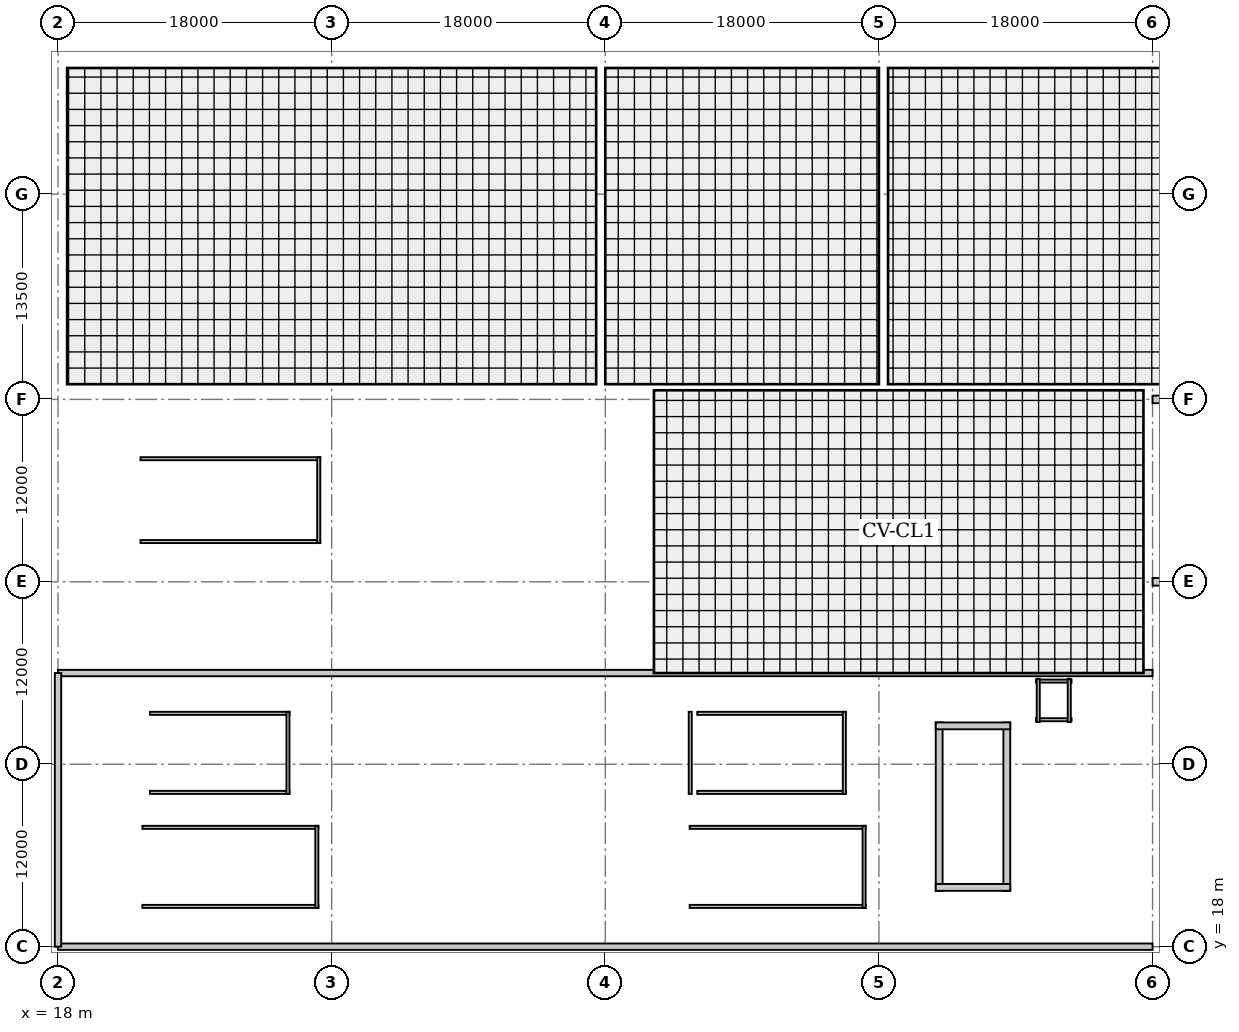
"""IFC4 building model, lengths in metres.
Left out: names, types, materials, properties, quantities, classifications, styles, units other than length and angle.
Written with IfcOpenShell. Run it as: python <this file> out.ifc"""

import sys

from ifc_helpers import new_model, si_unit, direction, frame, frame_2d, origin, origin_2d, place, context, subcontext, project, spatial, rectangle, circle, extrude, element, fill, save


model = new_model("IFC4")
c1 = context("Model", 3, precision=1e-05, world=origin(), true_north=direction((0.0, 1.0)))
c2 = subcontext(c1, "Body", "Model", "MODEL_VIEW")
j1 = project(units=[si_unit("LENGTHUNIT", "METRE"), si_unit("PLANEANGLEUNIT", "RADIAN")], contexts=[c1])
p1 = place(None, origin())
s1 = spatial("IfcSite", under=j1, at=p1, CompositionType="ELEMENT")
p2 = place(p1, origin())
s2 = spatial("IfcBuilding", under=s1, at=p2, CompositionType="ELEMENT")
p3 = place(p2, frame((0.0, 0.0, -5.4)))
s3 = spatial("IfcBuildingStorey", under=s2, at=p3, CompositionType="ELEMENT", Elevation=-5.4)
for number, where, z_axis, x_axis in (
    (1, (18.0, 18.0, 0.0), (0.0, 0.0, 1.0), (1.0, 0.0, 0.0)),
    (2, (18.0, 30.0, 0.0), (0.0, 0.0, 1.0), (1.0, 0.0, 0.0)),
    (3, (18.0, 36.0, 0.0), (0.0, 0.0, 1.0), (1.0, 0.0, 0.0)),
    (4, (18.0, 42.0, 0.0), (0.0, 0.0, 1.0), (1.0, 0.0, 0.0)),
    (5, (18.0, 54.0, 0.0), (0.0, 0.0, 1.0), (1.0, 0.0, 0.0)),
):
    element("IfcColumn", number, at=place(p3, frame(where, z_axis=z_axis, x_axis=x_axis)), inside=s3, PredefinedType="COLUMN", context=c2, shape_type="SweptSolid", body=[
        extrude(circle(Radius=0.5, at=origin_2d()), origin(), (0.0, 0.0, 1.0), 5.4),
    ])
p4 = place(p3, frame((18.0, 67.5, 0.0), z_axis=(0.0, 0.0, 1.0), x_axis=(1.0, 0.0, 0.0)))
e6 = element("IfcColumn", 6, at=p4, inside=s3, PredefinedType="COLUMN", context=c2, shape_type="SweptSolid", body=[
    extrude(rectangle(XDim=1.6, YDim=1.2, at=origin_2d()), origin(), (0.0, 0.0, 1.0), 5.4),
])
for number, where, z_axis, x_axis in (
    (7, (36.0, 18.0, 0.0), (0.0, 0.0, 1.0), (1.0, 0.0, 0.0)),
    (8, (36.0, 30.0, 0.0), (0.0, 0.0, 1.0), (1.0, 0.0, 0.0)),
    (9, (36.0, 36.0, 0.0), (0.0, 0.0, 1.0), (1.0, 0.0, 0.0)),
    (10, (36.0, 42.0, 0.0), (0.0, 0.0, 1.0), (1.0, 0.0, 0.0)),
    (11, (36.0, 54.0, 0.0), (0.0, 0.0, 1.0), (1.0, 0.0, 0.0)),
):
    element("IfcColumn", number, at=place(p3, frame(where, z_axis=z_axis, x_axis=x_axis)), inside=s3, PredefinedType="COLUMN", context=c2, shape_type="SweptSolid", body=[
        extrude(circle(Radius=0.5, at=origin_2d()), origin(), (0.0, 0.0, 1.0), 5.4),
    ])
p5 = place(p3, frame((36.0, 67.5, 0.0), z_axis=(0.0, 0.0, 1.0), x_axis=(1.0, 0.0, 0.0)))
e12 = element("IfcColumn", 12, at=p5, inside=s3, PredefinedType="COLUMN", context=c2, shape_type="SweptSolid", body=[
    extrude(rectangle(XDim=1.6, YDim=1.2, at=origin_2d()), origin(), (0.0, 0.0, 1.0), 5.4),
])
for number, where, z_axis, x_axis in (
    (13, (54.0, 18.0, 0.0), (0.0, 0.0, 1.0), (1.0, 0.0, 0.0)),
    (14, (54.0, 30.0, 0.0), (0.0, 0.0, 1.0), (1.0, 0.0, 0.0)),
    (15, (54.0, 36.0, 0.0), (0.0, 0.0, 1.0), (1.0, 0.0, 0.0)),
    (16, (54.0, 42.0, 0.0), (0.0, 0.0, 1.0), (1.0, 0.0, 0.0)),
    (17, (54.0, 54.0, 0.0), (0.0, 0.0, 1.0), (1.0, 0.0, 0.0)),
):
    element("IfcColumn", number, at=place(p3, frame(where, z_axis=z_axis, x_axis=x_axis)), inside=s3, PredefinedType="COLUMN", context=c2, shape_type="SweptSolid", body=[
        extrude(circle(Radius=0.5, at=origin_2d()), origin(), (0.0, 0.0, 1.0), 5.4),
    ])
p6 = place(p3, frame((54.0, 67.5, 0.0), z_axis=(0.0, 0.0, 1.0), x_axis=(1.0, 0.0, 0.0)))
e18 = element("IfcColumn", 18, at=p6, inside=s3, PredefinedType="COLUMN", context=c2, shape_type="SweptSolid", body=[
    extrude(rectangle(XDim=1.6, YDim=1.2, at=origin_2d()), origin(), (0.0, 0.0, 1.0), 5.4),
])
for number, where, z_axis, x_axis in (
    (19, (72.0, 18.0, 0.0), (0.0, 0.0, 1.0), (1.0, 0.0, 0.0)),
    (20, (72.0, 30.0, 0.0), (0.0, 0.0, 1.0), (1.0, 0.0, 0.0)),
    (21, (72.0, 36.0, 0.0), (0.0, 0.0, 1.0), (1.0, 0.0, 0.0)),
    (22, (72.0, 42.0, 0.0), (0.0, 0.0, 1.0), (1.0, 0.0, 0.0)),
    (23, (72.0, 54.0, 0.0), (0.0, 0.0, 1.0), (1.0, 0.0, 0.0)),
):
    element("IfcColumn", number, at=place(p3, frame(where, z_axis=z_axis, x_axis=x_axis)), inside=s3, PredefinedType="COLUMN", context=c2, shape_type="SweptSolid", body=[
        extrude(circle(Radius=0.5, at=origin_2d()), origin(), (0.0, 0.0, 1.0), 5.4),
    ])
p7 = place(p3, frame((72.0, 67.5, 0.0), z_axis=(0.0, 0.0, 1.0), x_axis=(1.0, 0.0, 0.0)))
e24 = element("IfcColumn", 24, at=p7, inside=s3, PredefinedType="COLUMN", context=c2, shape_type="SweptSolid", body=[
    extrude(rectangle(XDim=1.6, YDim=1.2, at=origin_2d()), origin(), (0.0, 0.0, 1.0), 5.4),
])
for number, where, z_axis, x_axis in (
    (25, (90.0, 18.0, 0.0), (0.0, 0.0, 1.0), (1.0, 0.0, 0.0)),
    (26, (90.0, 30.0, 0.0), (0.0, 0.0, 1.0), (1.0, 0.0, 0.0)),
    (27, (90.0, 36.0, 0.0), (0.0, 0.0, 1.0), (1.0, 0.0, 0.0)),
    (28, (90.0, 42.0, 0.0), (0.0, 0.0, 1.0), (1.0, 0.0, 0.0)),
    (29, (90.0, 54.0, 0.0), (0.0, 0.0, 1.0), (1.0, 0.0, 0.0)),
):
    element("IfcColumn", number, at=place(p3, frame(where, z_axis=z_axis, x_axis=x_axis)), inside=s3, PredefinedType="COLUMN", context=c2, shape_type="SweptSolid", body=[
        extrude(circle(Radius=0.5, at=origin_2d()), origin(), (0.0, 0.0, 1.0), 5.4),
    ])
p8 = place(p3, frame((90.0, 67.5, 0.0), z_axis=(0.0, 0.0, 1.0), x_axis=(1.0, 0.0, 0.0)))
e30 = element("IfcColumn", 30, at=p8, inside=s3, PredefinedType="COLUMN", context=c2, shape_type="SweptSolid", body=[
    extrude(rectangle(XDim=1.6, YDim=1.2, at=origin_2d()), origin(), (0.0, 0.0, 1.0), 5.4),
])
for number, where, z_axis, x_axis in (
    (31, (18.0, 62.5, 0.0), (0.0, 0.0, 1.0), (1.0, 0.0, 0.0)),
    (32, (36.0, 62.5, 0.0), (0.0, 0.0, 1.0), (1.0, 0.0, 0.0)),
    (33, (54.0, 62.5, 0.0), (0.0, 0.0, 1.0), (1.0, 0.0, 0.0)),
    (34, (72.0, 62.5, 0.0), (0.0, 0.0, 1.0), (1.0, 0.0, 0.0)),
    (35, (90.0, 62.5, 0.0), (0.0, 0.0, 1.0), (1.0, 0.0, 0.0)),
):
    element("IfcColumn", number, at=place(p3, frame(where, z_axis=z_axis, x_axis=x_axis)), inside=s3, PredefinedType="COLUMN", context=c2, shape_type="SweptSolid", body=[
        extrude(rectangle(XDim=0.75, YDim=0.75, at=origin_2d()), origin(), (0.0, 0.0, 1.0), 5.02),
    ])
for number, where, z_axis, x_axis in (
    (36, (18.0, 76.5, 0.0), (0.0, 0.0, 1.0), (1.0, 0.0, 0.0)),
    (37, (36.0, 76.5, 0.0), (0.0, 0.0, 1.0), (1.0, 0.0, 0.0)),
    (38, (54.0, 76.5, 0.0), (0.0, 0.0, 1.0), (1.0, 0.0, 0.0)),
    (39, (72.0, 76.5, 0.0), (0.0, 0.0, 1.0), (1.0, 0.0, 0.0)),
    (40, (90.0, 76.5, 0.0), (0.0, 0.0, 1.0), (1.0, 0.0, 0.0)),
):
    element("IfcColumn", number, at=place(p3, frame(where, z_axis=z_axis, x_axis=x_axis)), inside=s3, PredefinedType="COLUMN", context=c2, shape_type="SweptSolid", body=[
        extrude(rectangle(XDim=0.75, YDim=0.75, at=origin_2d()), origin(), (0.0, 0.0, 1.0), 3.5),
    ])
for number, where, z_axis, x_axis in (
    (41, (90.0, 54.0, 0.0), (0.0, 0.0, 1.0), (1.0, 0.0, 0.0)),
    (42, (136.0, 42.0, 0.0), (0.0, 0.0, 1.0), (-1.0, 0.0, 0.0)),
):
    element("IfcWall", number, at=place(p3, frame(where, z_axis=z_axis, x_axis=x_axis)), inside=s3, PredefinedType="USERDEFINED", context=c2, shape_type="SweptSolid", body=[
        extrude(rectangle(XDim=46.0, YDim=0.5, at=frame_2d((23.0, 0.0))), origin(), (0.0, 0.0, 1.0), 5.05),
    ])
for number, where, z_axis, x_axis in (
    (43, (18.0, 18.0, 0.0), (0.0, 0.0, 1.0), (1.0, 0.0, 0.0)),
    (44, (90.0, 36.0, 0.0), (0.0, 0.0, 1.0), (-1.0, 0.0, 0.0)),
):
    element("IfcWall", number, at=place(p3, frame(where, z_axis=z_axis, x_axis=x_axis)), inside=s3, PredefinedType="USERDEFINED", context=c2, shape_type="SweptSolid", body=[
        extrude(rectangle(XDim=72.0, YDim=0.42, at=frame_2d((36.0, 0.0))), origin(), (0.0, 0.0, 1.0), 5.05),
    ])
p9 = place(p3, frame((18.0, 36.0, 0.0), z_axis=(0.0, 0.0, 1.0), x_axis=(0.0, -1.0, 0.0)))
e45 = element("IfcWall", 45, at=p9, inside=s3, PredefinedType="USERDEFINED", context=c2, shape_type="SweptSolid", body=[
    extrude(rectangle(XDim=18.0, YDim=0.42, at=frame_2d((9.0, 0.0))), origin(), (0.0, 0.0, 1.0), 5.05),
])
for number, where, z_axis, x_axis in (
    (46, (80.413, 21.675, 0.0), (0.0, 0.0, 1.0), (0.0, 1.0, 0.0)),
    (47, (75.962, 32.75, 0.0), (0.0, 0.0, 1.0), (0.0, -1.0, 0.0)),
):
    element("IfcWall", number, at=place(p3, frame(where, z_axis=z_axis, x_axis=x_axis)), inside=s3, PredefinedType="SHEAR", context=c2, shape_type="SweptSolid", body=[
        extrude(rectangle(XDim=11.075, YDim=0.45, at=frame_2d((5.538, 0.0))), origin(), (0.0, 0.0, 1.0), 5.05),
    ])
p10 = place(p3, frame((80.637, 32.525, 0.0), z_axis=(0.0, 0.0, 1.0), x_axis=(-1.0, 0.0, 0.0)))
e48 = element("IfcWall", 48, at=p10, inside=s3, PredefinedType="SHEAR", context=c2, shape_type="SweptSolid", body=[
    extrude(rectangle(XDim=4.9, YDim=0.45, at=frame_2d((2.45, 0.0))), origin(), (0.0, 0.0, 1.0), 5.05),
])
p11 = place(p3, frame((75.738, 21.9, 0.0), z_axis=(0.0, 0.0, 1.0), x_axis=(1.0, 0.0, 0.0)))
e49 = element("IfcWall", 49, at=p11, inside=s3, PredefinedType="SHEAR", context=c2, shape_type="SweptSolid", body=[
    extrude(rectangle(XDim=4.9, YDim=0.45, at=frame_2d((2.45, 0.0))), origin(), (0.0, 0.0, 1.0), 5.05),
])
p12 = place(p11, frame((1.1, 0.0, 0.0)))
e50 = element("IfcOpeningElement", 50, at=p12, cuts=e49, PredefinedType="OPENING", context=c2, shape_type="SweptSolid", body=[
    extrude(rectangle(XDim=1.3, YDim=2.1, at=frame_2d((0.65, 1.05))), frame((0.0, 0.235, 0.0), z_axis=(0.0, -1.0, 0.0), x_axis=(1.0, 0.0, 0.0)), (0.0, 0.0, 1.0), 0.47),
])
for number, where, z_axis, x_axis in (
    (51, (23.425, 55.4, 0.0), (0.0, 0.0, 1.0), (1.0, 0.0, 0.0)),
    (52, (35.25, 60.85, 0.0), (0.0, 0.0, 1.0), (-1.0, 0.0, 0.0)),
):
    element("IfcWall", number, at=place(p3, frame(where, z_axis=z_axis, x_axis=x_axis)), inside=s3, PredefinedType="SOLIDWALL", context=c2, shape_type="SweptSolid", body=[
        extrude(rectangle(XDim=11.825, YDim=0.2, at=frame_2d((5.913, 0.0))), origin(), (0.0, 0.0, 1.0), 5.02),
    ])
p13 = place(p3, frame((35.15, 55.3, 0.0), z_axis=(0.0, 0.0, 1.0), x_axis=(0.0, 1.0, 0.0)))
e53 = element("IfcWall", 53, at=p13, inside=s3, PredefinedType="SOLIDWALL", context=c2, shape_type="SweptSolid", body=[
    extrude(rectangle(XDim=5.65, YDim=0.2, at=frame_2d((2.825, 0.0))), origin(), (0.0, 0.0, 1.0), 5.02),
])
for number, where, z_axis, x_axis in (
    (54, (59.425, 55.4, 0.0), (0.0, 0.0, 1.0), (1.0, 0.0, 0.0)),
    (55, (71.25, 60.85, 0.0), (0.0, 0.0, 1.0), (-1.0, 0.0, 0.0)),
):
    element("IfcWall", number, at=place(p3, frame(where, z_axis=z_axis, x_axis=x_axis)), inside=s3, PredefinedType="SOLIDWALL", context=c2, shape_type="SweptSolid", body=[
        extrude(rectangle(XDim=11.825, YDim=0.2, at=frame_2d((5.913, 0.0))), origin(), (0.0, 0.0, 1.0), 5.02),
    ])
p14 = place(p3, frame((71.15, 55.3, 0.0), z_axis=(0.0, 0.0, 1.0), x_axis=(0.0, 1.0, 0.0)))
e56 = element("IfcWall", 56, at=p14, inside=s3, PredefinedType="SOLIDWALL", context=c2, shape_type="SweptSolid", body=[
    extrude(rectangle(XDim=5.65, YDim=0.2, at=frame_2d((2.825, 0.0))), origin(), (0.0, 0.0, 1.0), 5.02),
])
for number, where, z_axis, x_axis in (
    (57, (23.55, 68.65, 0.0), (0.0, 0.0, 1.0), (1.0, 0.0, 0.0)),
    (58, (35.125, 73.85, 0.0), (0.0, 0.0, 1.0), (-1.0, 0.0, 0.0)),
):
    element("IfcWall", number, at=place(p3, frame(where, z_axis=z_axis, x_axis=x_axis)), inside=s3, PredefinedType="SOLIDWALL", context=c2, shape_type="SweptSolid", body=[
        extrude(rectangle(XDim=11.575, YDim=0.2, at=frame_2d((5.788, 0.0))), origin(), (0.0, 0.0, 1.0), 5.02),
    ])
p15 = place(p3, frame((35.025, 68.55, 0.0), z_axis=(0.0, 0.0, 1.0), x_axis=(0.0, 1.0, 0.0)))
e59 = element("IfcWall", 59, at=p15, inside=s3, PredefinedType="SOLIDWALL", context=c2, shape_type="SweptSolid", body=[
    extrude(rectangle(XDim=5.4, YDim=0.2, at=frame_2d((2.7, 0.0))), origin(), (0.0, 0.0, 1.0), 5.02),
])
for number, where, z_axis, x_axis in (
    (60, (59.55, 68.65, 0.0), (0.0, 0.0, 1.0), (1.0, 0.0, 0.0)),
    (61, (71.125, 73.85, 0.0), (0.0, 0.0, 1.0), (-1.0, 0.0, 0.0)),
):
    element("IfcWall", number, at=place(p3, frame(where, z_axis=z_axis, x_axis=x_axis)), inside=s3, PredefinedType="SOLIDWALL", context=c2, shape_type="SweptSolid", body=[
        extrude(rectangle(XDim=11.575, YDim=0.2, at=frame_2d((5.788, 0.0))), origin(), (0.0, 0.0, 1.0), 5.02),
    ])
p16 = place(p3, frame((71.025, 68.55, 0.0), z_axis=(0.0, 0.0, 1.0), x_axis=(0.0, 1.0, 0.0)))
e62 = element("IfcWall", 62, at=p16, inside=s3, PredefinedType="SOLIDWALL", context=c2, shape_type="SweptSolid", body=[
    extrude(rectangle(XDim=5.4, YDim=0.2, at=frame_2d((2.7, 0.0))), origin(), (0.0, 0.0, 1.0), 5.02),
])
for number, where, z_axis, x_axis in (
    (63, (23.55, 20.65, 0.0), (0.0, 0.0, 1.0), (1.0, 0.0, 0.0)),
    (64, (35.125, 25.85, 0.0), (0.0, 0.0, 1.0), (-1.0, 0.0, 0.0)),
):
    element("IfcWall", number, at=place(p3, frame(where, z_axis=z_axis, x_axis=x_axis)), inside=s3, PredefinedType="SOLIDWALL", context=c2, shape_type="SweptSolid", body=[
        extrude(rectangle(XDim=11.575, YDim=0.2, at=frame_2d((5.788, 0.0))), origin(), (0.0, 0.0, 1.0), 5.05),
    ])
p17 = place(p3, frame((35.025, 20.55, 0.0), z_axis=(0.0, 0.0, 1.0), x_axis=(0.0, 1.0, 0.0)))
e65 = element("IfcWall", 65, at=p17, inside=s3, PredefinedType="SOLIDWALL", context=c2, shape_type="SweptSolid", body=[
    extrude(rectangle(XDim=5.4, YDim=0.2, at=frame_2d((2.7, 0.0))), origin(), (0.0, 0.0, 1.0), 5.05),
])
for number, where, z_axis, x_axis in (
    (66, (59.55, 20.65, 0.0), (0.0, 0.0, 1.0), (1.0, 0.0, 0.0)),
    (67, (71.125, 25.85, 0.0), (0.0, 0.0, 1.0), (-1.0, 0.0, 0.0)),
):
    element("IfcWall", number, at=place(p3, frame(where, z_axis=z_axis, x_axis=x_axis)), inside=s3, PredefinedType="SOLIDWALL", context=c2, shape_type="SweptSolid", body=[
        extrude(rectangle(XDim=11.575, YDim=0.2, at=frame_2d((5.788, 0.0))), origin(), (0.0, 0.0, 1.0), 5.05),
    ])
p18 = place(p3, frame((71.025, 20.55, 0.0), z_axis=(0.0, 0.0, 1.0), x_axis=(0.0, 1.0, 0.0)))
e68 = element("IfcWall", 68, at=p18, inside=s3, PredefinedType="SOLIDWALL", context=c2, shape_type="SweptSolid", body=[
    extrude(rectangle(XDim=5.4, YDim=0.2, at=frame_2d((2.7, 0.0))), origin(), (0.0, 0.0, 1.0), 5.05),
])
for number, where, z_axis, x_axis in (
    (69, (23.425, 44.65, 0.0), (0.0, 0.0, 1.0), (1.0, 0.0, 0.0)),
    (70, (35.25, 50.1, 0.0), (0.0, 0.0, 1.0), (-1.0, 0.0, 0.0)),
):
    element("IfcWall", number, at=place(p3, frame(where, z_axis=z_axis, x_axis=x_axis)), inside=s3, PredefinedType="SOLIDWALL", context=c2, shape_type="SweptSolid", body=[
        extrude(rectangle(XDim=11.825, YDim=0.2, at=frame_2d((5.913, 0.0))), origin(), (0.0, 0.0, 1.0), 5.05),
    ])
p19 = place(p3, frame((35.15, 44.55, 0.0), z_axis=(0.0, 0.0, 1.0), x_axis=(0.0, 1.0, 0.0)))
e71 = element("IfcWall", 71, at=p19, inside=s3, PredefinedType="SOLIDWALL", context=c2, shape_type="SweptSolid", body=[
    extrude(rectangle(XDim=5.65, YDim=0.2, at=frame_2d((2.825, 0.0))), origin(), (0.0, 0.0, 1.0), 5.05),
])
for number, where, z_axis, x_axis in (
    (72, (59.425, 44.65, 0.0), (0.0, 0.0, 1.0), (1.0, 0.0, 0.0)),
    (73, (71.25, 50.1, 0.0), (0.0, 0.0, 1.0), (-1.0, 0.0, 0.0)),
):
    element("IfcWall", number, at=place(p3, frame(where, z_axis=z_axis, x_axis=x_axis)), inside=s3, PredefinedType="SOLIDWALL", context=c2, shape_type="SweptSolid", body=[
        extrude(rectangle(XDim=11.825, YDim=0.2, at=frame_2d((5.913, 0.0))), origin(), (0.0, 0.0, 1.0), 5.05),
    ])
p20 = place(p3, frame((71.15, 44.55, 0.0), z_axis=(0.0, 0.0, 1.0), x_axis=(0.0, 1.0, 0.0)))
e74 = element("IfcWall", 74, at=p20, inside=s3, PredefinedType="SOLIDWALL", context=c2, shape_type="SweptSolid", body=[
    extrude(rectangle(XDim=5.65, YDim=0.2, at=frame_2d((2.825, 0.0))), origin(), (0.0, 0.0, 1.0), 5.05),
])
for number, where, z_axis, x_axis in (
    (75, (24.05, 28.15, 0.0), (0.0, 0.0, 1.0), (1.0, 0.0, 0.0)),
    (76, (33.225, 33.35, 0.0), (0.0, 0.0, 1.0), (-1.0, 0.0, 0.0)),
):
    element("IfcWall", number, at=place(p3, frame(where, z_axis=z_axis, x_axis=x_axis)), inside=s3, PredefinedType="SOLIDWALL", context=c2, shape_type="SweptSolid", body=[
        extrude(rectangle(XDim=9.175, YDim=0.2, at=frame_2d((4.587, 0.0))), origin(), (0.0, 0.0, 1.0), 5.05),
    ])
p21 = place(p3, frame((33.125, 28.05, 0.0), z_axis=(0.0, 0.0, 1.0), x_axis=(0.0, 1.0, 0.0)))
e77 = element("IfcWall", 77, at=p21, inside=s3, PredefinedType="SOLIDWALL", context=c2, shape_type="SweptSolid", body=[
    extrude(rectangle(XDim=5.4, YDim=0.2, at=frame_2d((2.7, 0.0))), origin(), (0.0, 0.0, 1.0), 5.05),
])
for number, where, z_axis, x_axis in (
    (78, (60.05, 28.15, 0.0), (0.0, 0.0, 1.0), (1.0, 0.0, 0.0)),
    (79, (69.825, 33.35, 0.0), (0.0, 0.0, 1.0), (-1.0, 0.0, 0.0)),
):
    element("IfcWall", number, at=place(p3, frame(where, z_axis=z_axis, x_axis=x_axis)), inside=s3, PredefinedType="SOLIDWALL", context=c2, shape_type="SweptSolid", body=[
        extrude(rectangle(XDim=9.775, YDim=0.2, at=frame_2d((4.887, 0.0))), origin(), (0.0, 0.0, 1.0), 5.05),
    ])
p22 = place(p3, frame((69.725, 28.05, 0.0), z_axis=(0.0, 0.0, 1.0), x_axis=(0.0, 1.0, 0.0)))
e80 = element("IfcWall", 80, at=p22, inside=s3, PredefinedType="SOLIDWALL", context=c2, shape_type="SweptSolid", body=[
    extrude(rectangle(XDim=5.4, YDim=0.2, at=frame_2d((2.7, 0.0))), origin(), (0.0, 0.0, 1.0), 5.05),
])
p23 = place(p3, frame((59.587, 33.45, 0.0), z_axis=(0.0, 0.0, 1.0), x_axis=(0.0, -1.0, 0.0)))
e81 = element("IfcWall", 81, at=p23, inside=s3, PredefinedType="SOLIDWALL", context=c2, shape_type="SweptSolid", body=[
    extrude(rectangle(XDim=5.4, YDim=0.2, at=frame_2d((2.7, 0.0))), origin(), (0.0, 0.0, 1.0), 4.4),
])
p24 = place(p23, frame((1.9, 0.0, 0.0)))
e82 = element("IfcOpeningElement", 82, at=p24, cuts=e81, PredefinedType="OPENING", context=c2, shape_type="SweptSolid", body=[
    extrude(rectangle(XDim=1.6, YDim=2.15, at=frame_2d((0.8, 1.075))), frame((0.0, 0.11, 0.0), z_axis=(0.0, -1.0, 0.0), x_axis=(1.0, 0.0, 0.0)), (0.0, 0.0, 1.0), 0.22),
])
p25 = place(p3, frame((82.33, 32.93, 0.0), z_axis=(0.0, 0.0, 1.0), x_axis=(1.0, 0.0, 0.0)))
e83 = element("IfcWall", 83, at=p25, inside=s3, PredefinedType="SOLIDWALL", context=c2, shape_type="SweptSolid", body=[
    extrude(rectangle(XDim=2.34, YDim=0.2, at=frame_2d((1.17, 0.0))), origin(), (0.0, 0.0, 1.0), 4.4),
])
p26 = place(p3, frame((84.67, 35.47, 0.0), z_axis=(0.0, 0.0, 1.0), x_axis=(-1.0, 0.0, 0.0)))
e84 = element("IfcWall", 84, at=p26, inside=s3, PredefinedType="SOLIDWALL", context=c2, shape_type="SweptSolid", body=[
    extrude(rectangle(XDim=2.34, YDim=0.2, at=frame_2d((1.17, 0.0))), origin(), (0.0, 0.0, 1.0), 4.325),
])
p27 = place(p3, frame((82.48, 35.62, 0.0), z_axis=(0.0, 0.0, 1.0), x_axis=(0.0, -1.0, 0.0)))
e85 = element("IfcWall", 85, at=p27, inside=s3, PredefinedType="SOLIDWALL", context=c2, shape_type="SweptSolid", body=[
    extrude(rectangle(XDim=2.84, YDim=0.2, at=frame_2d((1.42, 0.0))), origin(), (0.0, 0.0, 1.0), 4.325),
])
p28 = place(p27, frame((0.87, 0.0, 0.0)))
e86 = element("IfcOpeningElement", 86, at=p28, cuts=e85, PredefinedType="OPENING", context=c2, shape_type="SweptSolid", body=[
    extrude(rectangle(XDim=1.1, YDim=2.15, at=frame_2d((0.55, 1.075))), frame((0.0, 0.11, 0.0), z_axis=(0.0, -1.0, 0.0), x_axis=(1.0, 0.0, 0.0)), (0.0, 0.0, 1.0), 0.22),
])
p29 = place(p3, frame((84.52, 32.78, 0.0), z_axis=(0.0, 0.0, 1.0), x_axis=(0.0, 1.0, 0.0)))
e87 = element("IfcWall", 87, at=p29, inside=s3, PredefinedType="SOLIDWALL", context=c2, shape_type="SweptSolid", body=[
    extrude(rectangle(XDim=2.84, YDim=0.2, at=frame_2d((1.42, 0.0))), origin(), (0.0, 0.0, 1.0), 4.325),
])
p30 = place(p12, origin())
e88 = element("IfcDoor", 88, at=p30, inside=s3, OperationType="SINGLE_SWING_RIGHT", PredefinedType="DOOR", context=c2, shape_type="SweptSolid", body=[
    extrude(rectangle(XDim=1.3, YDim=2.1, at=frame_2d((0.65, 1.05))), frame((0.0, 0.025, 0.0), z_axis=(0.0, -1.0, 0.0), x_axis=(1.0, 0.0, 0.0)), (0.0, 0.0, 1.0), 0.05),
])
fill(e50, e88)
p31 = place(p24, origin())
e89 = element("IfcDoor", 89, at=p31, inside=s3, OperationType="SINGLE_SWING_RIGHT", PredefinedType="DOOR", context=c2, shape_type="SweptSolid", body=[
    extrude(rectangle(XDim=1.6, YDim=2.15, at=frame_2d((0.8, 1.075))), frame((0.0, 0.025, 0.0), z_axis=(0.0, -1.0, 0.0), x_axis=(1.0, 0.0, 0.0)), (0.0, 0.0, 1.0), 0.05),
])
fill(e82, e89)
p32 = place(p28, origin())
e90 = element("IfcDoor", 90, at=p32, inside=s3, OperationType="SLIDING_TO_LEFT", PredefinedType="DOOR", context=c2, shape_type="SweptSolid", body=[
    extrude(rectangle(XDim=1.1, YDim=2.15, at=frame_2d((0.55, 1.075))), frame((0.0, 0.025, 0.0), z_axis=(0.0, -1.0, 0.0), x_axis=(1.0, 0.0, 0.0)), (0.0, 0.0, 1.0), 0.05),
])
fill(e86, e90)
save(model, sys.argv[1])
